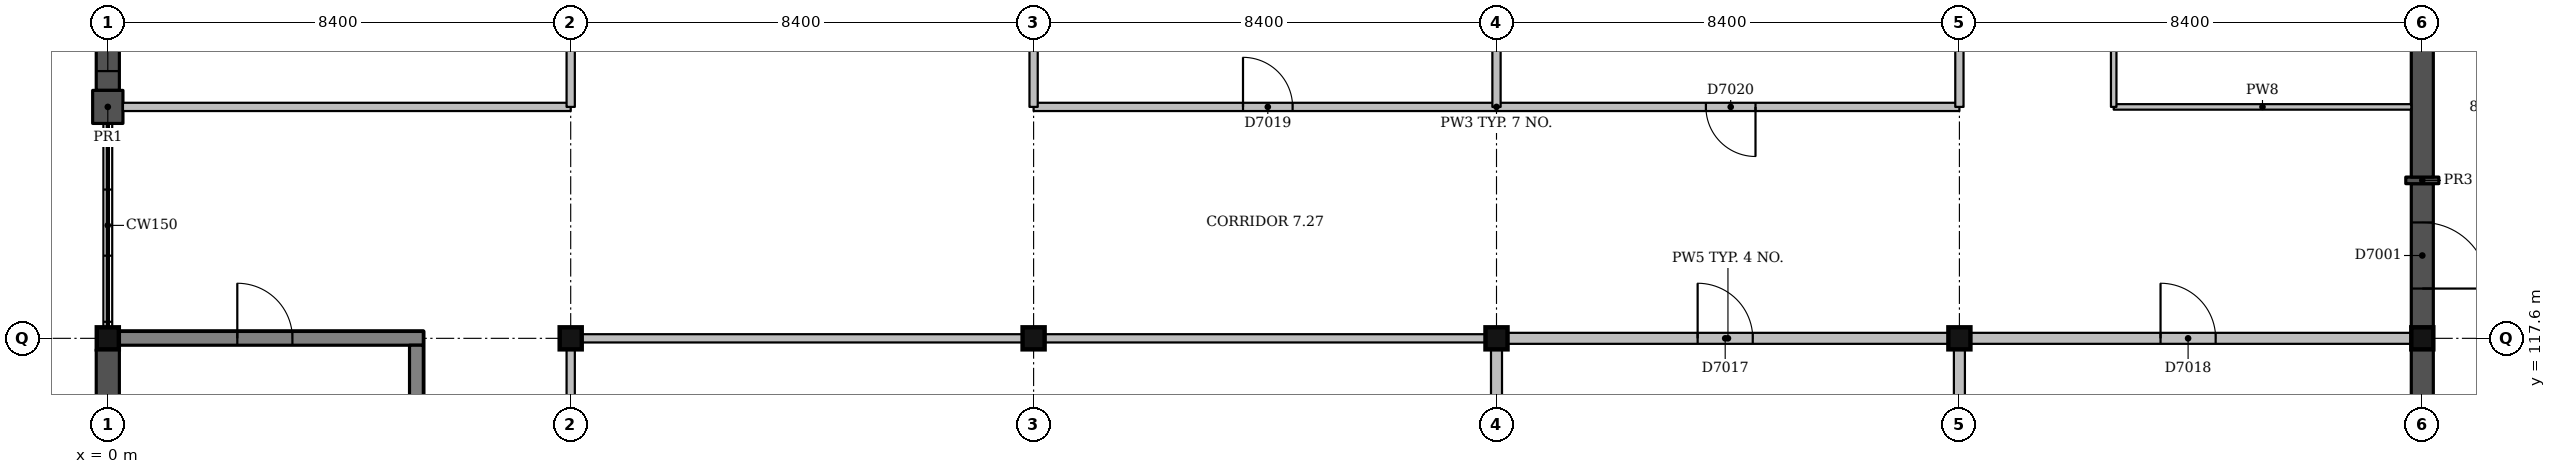
"""IFC4 building model, lengths in metres.
Left out: names, types, materials, properties, quantities, classifications, styles, units other than length and angle.
Written with IfcOpenShell. Run it as: python <this file> out.ifc"""

import sys

from ifc_helpers import new_model, si_unit, direction, frame, frame_2d, origin, origin_2d, place, context, subcontext, project, spatial, rectangle, extrude, element, fill, save


model = new_model("IFC4")
c1 = context("Model", 3, precision=1e-05, world=origin(), true_north=direction((0.0, 1.0)))
c2 = subcontext(c1, "Body", "Model", "MODEL_VIEW")
j1 = project(units=[si_unit("LENGTHUNIT", "METRE"), si_unit("PLANEANGLEUNIT", "RADIAN")], contexts=[c1])
p1 = place(None, origin())
s1 = spatial("IfcSite", under=j1, at=p1, CompositionType="ELEMENT")
p2 = place(p1, origin())
s2 = spatial("IfcBuilding", under=s1, at=p2, CompositionType="ELEMENT")
p3 = place(p2, frame((0.0, 0.0, 31.5)))
s3 = spatial("IfcBuildingStorey", under=s2, at=p3, CompositionType="ELEMENT", Elevation=31.5)
for number, where, z_axis, x_axis in (
    (1, (0.0, 117.6, 0.0), (0.0, 0.0, 1.0), (1.0, 0.0, 0.0)),
    (2, (8.4, 117.6, 0.0), (0.0, 0.0, 1.0), (1.0, 0.0, 0.0)),
    (3, (16.8, 117.6, 0.0), (0.0, 0.0, 1.0), (1.0, 0.0, 0.0)),
    (4, (25.2, 117.6, 0.0), (0.0, 0.0, 1.0), (1.0, 0.0, 0.0)),
    (5, (33.6, 117.6, 0.0), (0.0, 0.0, 1.0), (1.0, 0.0, 0.0)),
    (6, (42.0, 117.6, 0.0), (0.0, 0.0, 1.0), (1.0, 0.0, 0.0)),
):
    element("IfcColumn", number, at=place(p3, frame(where, z_axis=z_axis, x_axis=x_axis)), inside=s3, PredefinedType="COLUMN", context=c2, shape_type="SweptSolid", body=[
        extrude(rectangle(XDim=0.4, YDim=0.4, at=origin_2d()), origin(), (0.0, 0.0, 1.0), 4.5),
    ])
p4 = place(p3, frame((0.2, 117.6, 0.0), z_axis=(0.0, 0.0, 1.0), x_axis=(1.0, 0.0, 0.0)))
e7 = element("IfcWall", 7, at=p4, inside=s3, PredefinedType="SHEAR", context=c2, shape_type="SweptSolid", body=[
    extrude(rectangle(XDim=5.525, YDim=0.25, at=frame_2d((2.763, 0.0))), origin(), (0.0, 0.0, 1.0), 4.2),
])
p5 = place(p4, frame((2.15, 0.0, 0.0)))
e8 = element("IfcOpeningElement", 8, at=p5, cuts=e7, PredefinedType="OPENING", context=c2, shape_type="SweptSolid", body=[
    extrude(rectangle(XDim=1.0, YDim=2.1, at=frame_2d((0.5, 1.05))), frame((0.0, 0.135, 0.0), z_axis=(0.0, -1.0, 0.0), x_axis=(1.0, 0.0, 0.0)), (0.0, 0.0, 1.0), 0.27),
])
p6 = place(p3, frame((5.6, 109.325, 0.0), z_axis=(0.0, 0.0, 1.0), x_axis=(0.0, 1.0, 0.0)))
e9 = element("IfcWall", 9, at=p6, inside=s3, PredefinedType="SHEAR", context=c2, shape_type="SweptSolid", body=[
    extrude(rectangle(XDim=8.15, YDim=0.25, at=frame_2d((4.075, 0.0))), origin(), (0.0, 0.0, 1.0), 4.2),
])
p7 = place(p3, frame((42.0, 113.46, 0.0), z_axis=(0.0, 0.0, 1.0), x_axis=(0.0, 1.0, 0.0)))
e10 = element("IfcWall", 10, at=p7, inside=s3, PredefinedType="SOLIDWALL", context=c2, shape_type="SweptSolid", body=[
    extrude(rectangle(XDim=3.94, YDim=0.4, at=frame_2d((1.97, 0.0))), origin(), (0.0, 0.0, 1.0), 3.6),
])
p8 = place(p7, frame((1.37, 0.0, 2.4)))
e11 = element("IfcOpeningElement", 11, at=p8, cuts=e10, PredefinedType="OPENING", context=c2, shape_type="SweptSolid", body=[
    extrude(rectangle(XDim=1.2, YDim=0.6, at=frame_2d((0.6, 0.3))), frame((0.0, 0.21, 0.0), z_axis=(0.0, -1.0, 0.0), x_axis=(1.0, 0.0, 0.0)), (0.0, 0.0, 1.0), 0.42),
])
p9 = place(p3, frame((42.0, 117.8, 0.0), z_axis=(0.0, 0.0, 1.0), x_axis=(0.0, 1.0, 0.0)))
e12 = element("IfcWall", 12, at=p9, inside=s3, PredefinedType="SOLIDWALL", context=c2, shape_type="SweptSolid", body=[
    extrude(rectangle(XDim=2.607, YDim=0.4, at=frame_2d((1.303, 0.0))), origin(), (0.0, 0.0, 1.0), 3.6),
])
p10 = place(p9, frame((0.703, 0.0, 0.0)))
e13 = element("IfcOpeningElement", 13, at=p10, cuts=e12, PredefinedType="OPENING", context=c2, shape_type="SweptSolid", body=[
    extrude(rectangle(XDim=1.2, YDim=2.1, at=frame_2d((0.6, 1.05))), frame((0.0, 0.21, 0.0), z_axis=(0.0, -1.0, 0.0), x_axis=(1.0, 0.0, 0.0)), (0.0, 0.0, 1.0), 0.42),
])
p11 = place(p3, frame((42.0, 120.407, 0.0), z_axis=(0.0, 0.0, 1.0), x_axis=(0.0, 1.0, 0.0)))
e14 = element("IfcWall", 14, at=p11, inside=s3, PredefinedType="SOLIDWALL", context=c2, shape_type="SweptSolid", body=[
    extrude(rectangle(XDim=0.12, YDim=0.6, at=frame_2d((0.06, 0.0))), origin(), (0.0, 0.0, 1.0), 3.6),
])
p12 = place(p3, frame((42.0, 120.527, 0.0), z_axis=(0.0, 0.0, 1.0), x_axis=(0.0, 1.0, 0.0)))
e15 = element("IfcWall", 15, at=p12, inside=s3, PredefinedType="SOLIDWALL", context=c2, shape_type="SweptSolid", body=[
    extrude(rectangle(XDim=2.547, YDim=0.4, at=frame_2d((1.273, 0.0))), origin(), (0.0, 0.0, 1.0), 3.6),
])
p13 = place(p3, frame((0.0, 125.8, 0.0), z_axis=(0.0, 0.0, 1.0), x_axis=(0.0, -1.0, 0.0)))
e16 = element("IfcWall", 16, at=p13, inside=s3, PredefinedType="SOLIDWALL", context=c2, shape_type="SweptSolid", body=[
    extrude(rectangle(XDim=3.7, YDim=0.42, at=frame_2d((1.85, 0.0))), origin(), (0.0, 0.0, 1.0), 3.6),
])
p14 = place(p13, frame((0.35, 0.0, 1.0)))
e17 = element("IfcOpeningElement", 17, at=p14, cuts=e16, PredefinedType="OPENING", context=c2, shape_type="SweptSolid", body=[
    extrude(rectangle(XDim=0.6, YDim=2.1, at=frame_2d((0.3, 1.05))), frame((0.0, 0.22, 0.0), z_axis=(0.0, -1.0, 0.0), x_axis=(1.0, 0.0, 0.0)), (0.0, 0.0, 1.0), 0.44),
])
p15 = place(p13, frame((1.55, 0.0, 1.0)))
e18 = element("IfcOpeningElement", 18, at=p15, cuts=e16, PredefinedType="OPENING", context=c2, shape_type="SweptSolid", body=[
    extrude(rectangle(XDim=0.6, YDim=2.1, at=frame_2d((0.3, 1.05))), frame((0.0, 0.22, 0.0), z_axis=(0.0, -1.0, 0.0), x_axis=(1.0, 0.0, 0.0)), (0.0, 0.0, 1.0), 0.44),
])
p16 = place(p13, frame((2.75, 0.0, 1.0)))
e19 = element("IfcOpeningElement", 19, at=p16, cuts=e16, PredefinedType="OPENING", context=c2, shape_type="SweptSolid", body=[
    extrude(rectangle(XDim=0.6, YDim=2.1, at=frame_2d((0.3, 1.05))), frame((0.0, 0.22, 0.0), z_axis=(0.0, -1.0, 0.0), x_axis=(1.0, 0.0, 0.0)), (0.0, 0.0, 1.0), 0.44),
])
p17 = place(p3, frame((0.0, 122.1, 0.0), z_axis=(0.0, 0.0, 1.0), x_axis=(0.0, -1.0, 0.0)))
e20 = element("IfcWall", 20, at=p17, inside=s3, PredefinedType="SOLIDWALL", context=c2, shape_type="SweptSolid", body=[
    extrude(rectangle(XDim=0.6, YDim=0.55, at=frame_2d((0.3, 0.0))), origin(), (0.0, 0.0, 1.0), 3.6),
])
p18 = place(p3, frame((0.0, 117.4, 0.0), z_axis=(0.0, 0.0, 1.0), x_axis=(0.0, -1.0, 0.0)))
e21 = element("IfcWall", 21, at=p18, inside=s3, PredefinedType="SOLIDWALL", context=c2, shape_type="SweptSolid", body=[
    extrude(rectangle(XDim=3.7, YDim=0.42, at=frame_2d((1.85, 0.0))), origin(), (0.0, 0.0, 1.0), 4.2),
])
for number, where, z_axis, x_axis in (
    (22, (8.6, 117.6, 0.0), (0.0, 0.0, 1.0), (1.0, 0.0, 0.0)),
    (23, (17.0, 117.6, 0.0), (0.0, 0.0, 1.0), (1.0, 0.0, 0.0)),
):
    element("IfcWall", number, at=place(p3, frame(where, z_axis=z_axis, x_axis=x_axis)), inside=s3, PredefinedType="PARTITIONING", context=c2, shape_type="SweptSolid", body=[
        extrude(rectangle(XDim=8.0, YDim=0.15, at=frame_2d((4.0, 0.0))), origin(), (0.0, 0.0, 1.0), 3.6),
    ])
p19 = place(p3, frame((25.4, 117.6, 0.0), z_axis=(0.0, 0.0, 1.0), x_axis=(1.0, 0.0, 0.0)))
e24 = element("IfcWall", 24, at=p19, inside=s3, PredefinedType="PARTITIONING", context=c2, shape_type="SweptSolid", body=[
    extrude(rectangle(XDim=8.0, YDim=0.2, at=frame_2d((4.0, 0.0))), origin(), (0.0, 0.0, 1.0), 3.6),
])
p20 = place(p19, frame((3.45, 0.0, 0.0)))
e25 = element("IfcOpeningElement", 25, at=p20, cuts=e24, PredefinedType="OPENING", context=c2, shape_type="SweptSolid", body=[
    extrude(rectangle(XDim=1.0, YDim=2.1, at=frame_2d((0.5, 1.05))), frame((0.0, 0.11, 0.0), z_axis=(0.0, -1.0, 0.0), x_axis=(1.0, 0.0, 0.0)), (0.0, 0.0, 1.0), 0.22),
])
p21 = place(p3, frame((33.8, 117.6, 0.0), z_axis=(0.0, 0.0, 1.0), x_axis=(1.0, 0.0, 0.0)))
e26 = element("IfcWall", 26, at=p21, inside=s3, PredefinedType="PARTITIONING", context=c2, shape_type="SweptSolid", body=[
    extrude(rectangle(XDim=8.0, YDim=0.2, at=frame_2d((4.0, 0.0))), origin(), (0.0, 0.0, 1.0), 3.6),
])
p22 = place(p21, frame((3.45, 0.0, 0.0)))
e27 = element("IfcOpeningElement", 27, at=p22, cuts=e26, PredefinedType="OPENING", context=c2, shape_type="SweptSolid", body=[
    extrude(rectangle(XDim=1.0, YDim=2.1, at=frame_2d((0.5, 1.05))), frame((0.0, 0.11, 0.0), z_axis=(0.0, -1.0, 0.0), x_axis=(1.0, 0.0, 0.0)), (0.0, 0.0, 1.0), 0.22),
])
p23 = place(p3, frame((0.275, 121.8, 0.0), z_axis=(0.0, 0.0, 1.0), x_axis=(1.0, 0.0, 0.0)))
e28 = element("IfcWall", 28, at=p23, inside=s3, PredefinedType="PARTITIONING", context=c2, shape_type="SweptSolid", body=[
    extrude(rectangle(XDim=8.125, YDim=0.15, at=frame_2d((4.062, 0.0))), origin(), (0.0, 0.0, 1.0), 3.6),
])
p24 = place(p3, frame((16.8, 121.8, 0.0), z_axis=(0.0, 0.0, 1.0), x_axis=(1.0, 0.0, 0.0)))
e29 = element("IfcWall", 29, at=p24, inside=s3, PredefinedType="PARTITIONING", context=c2, shape_type="SweptSolid", body=[
    extrude(rectangle(XDim=16.8, YDim=0.15, at=frame_2d((8.4, 0.0))), origin(), (0.0, 0.0, 1.0), 3.6),
])
p25 = place(p24, frame((3.8, 0.0, 0.0)))
e30 = element("IfcOpeningElement", 30, at=p25, cuts=e29, PredefinedType="OPENING", context=c2, shape_type="SweptSolid", body=[
    extrude(rectangle(XDim=0.9, YDim=2.1, at=frame_2d((0.45, 1.05))), frame((0.0, 0.085, 0.0), z_axis=(0.0, -1.0, 0.0), x_axis=(1.0, 0.0, 0.0)), (0.0, 0.0, 1.0), 0.17),
])
p26 = place(p24, frame((12.2, 0.0, 0.0)))
e31 = element("IfcOpeningElement", 31, at=p26, cuts=e29, PredefinedType="OPENING", context=c2, shape_type="SweptSolid", body=[
    extrude(rectangle(XDim=0.9, YDim=2.1, at=frame_2d((0.45, 1.05))), frame((0.0, 0.085, 0.0), z_axis=(0.0, -1.0, 0.0), x_axis=(1.0, 0.0, 0.0)), (0.0, 0.0, 1.0), 0.17),
])
p27 = place(p3, frame((36.4, 121.8, 0.0), z_axis=(0.0, 0.0, 1.0), x_axis=(1.0, 0.0, 0.0)))
e32 = element("IfcWall", 32, at=p27, inside=s3, PredefinedType="PARTITIONING", context=c2, shape_type="SweptSolid", body=[
    extrude(rectangle(XDim=5.4, YDim=0.1, at=frame_2d((2.7, 0.0))), origin(), (0.0, 0.0, 1.0), 4.15),
])
p28 = place(p3, frame((8.4, 113.55, 0.0), z_axis=(0.0, 0.0, 1.0), x_axis=(0.0, 1.0, 0.0)))
e33 = element("IfcWall", 33, at=p28, inside=s3, PredefinedType="PARTITIONING", context=c2, shape_type="SweptSolid", body=[
    extrude(rectangle(XDim=3.85, YDim=0.15, at=frame_2d((1.925, 0.0))), origin(), (0.0, 0.0, 1.0), 3.6),
])
p29 = place(p28, frame((1.35, 0.0, 0.0)))
e34 = element("IfcOpeningElement", 34, at=p29, cuts=e33, PredefinedType="OPENING", context=c2, shape_type="SweptSolid", body=[
    extrude(rectangle(XDim=1.0, YDim=2.1, at=frame_2d((0.5, 1.05))), frame((0.0, 0.085, 0.0), z_axis=(0.0, -1.0, 0.0), x_axis=(1.0, 0.0, 0.0)), (0.0, 0.0, 1.0), 0.17),
])
p30 = place(p3, frame((8.4, 121.8, 0.0), z_axis=(0.0, 0.0, 1.0), x_axis=(0.0, 1.0, 0.0)))
e35 = element("IfcWall", 35, at=p30, inside=s3, PredefinedType="PARTITIONING", context=c2, shape_type="SweptSolid", body=[
    extrude(rectangle(XDim=4.0, YDim=0.15, at=frame_2d((2.0, 0.0))), origin(), (0.0, 0.0, 1.0), 3.6),
])
p31 = place(p30, frame((1.35, 0.0, 0.0)))
e36 = element("IfcOpeningElement", 36, at=p31, cuts=e35, PredefinedType="OPENING", context=c2, shape_type="SweptSolid", body=[
    extrude(rectangle(XDim=1.0, YDim=2.1, at=frame_2d((0.5, 1.05))), frame((0.0, 0.085, 0.0), z_axis=(0.0, -1.0, 0.0), x_axis=(1.0, 0.0, 0.0)), (0.0, 0.0, 1.0), 0.17),
])
p32 = place(p3, frame((16.8, 121.8, 0.0), z_axis=(0.0, 0.0, 1.0), x_axis=(0.0, 1.0, 0.0)))
e37 = element("IfcWall", 37, at=p32, inside=s3, PredefinedType="PARTITIONING", context=c2, shape_type="SweptSolid", body=[
    extrude(rectangle(XDim=4.0, YDim=0.15, at=frame_2d((2.0, 0.0))), origin(), (0.0, 0.0, 1.0), 3.6),
])
p33 = place(p3, frame((25.2, 109.4, 0.0), z_axis=(0.0, 0.0, 1.0), x_axis=(0.0, 1.0, 0.0)))
e38 = element("IfcWall", 38, at=p33, inside=s3, PredefinedType="PARTITIONING", context=c2, shape_type="SweptSolid", body=[
    extrude(rectangle(XDim=8.0, YDim=0.2, at=frame_2d((4.0, 0.0))), origin(), (0.0, 0.0, 1.0), 4.15),
])
for number, where, z_axis, x_axis in (
    (39, (25.2, 121.8, 0.0), (0.0, 0.0, 1.0), (0.0, 1.0, 0.0)),
    (40, (33.6, 121.8, 0.0), (0.0, 0.0, 1.0), (0.0, 1.0, 0.0)),
):
    element("IfcWall", number, at=place(p3, frame(where, z_axis=z_axis, x_axis=x_axis)), inside=s3, PredefinedType="PARTITIONING", context=c2, shape_type="SweptSolid", body=[
        extrude(rectangle(XDim=4.0, YDim=0.15, at=frame_2d((2.0, 0.0))), origin(), (0.0, 0.0, 1.0), 3.6),
    ])
p34 = place(p3, frame((33.6, 109.4, 0.0), z_axis=(0.0, 0.0, 1.0), x_axis=(0.0, 1.0, 0.0)))
e41 = element("IfcWall", 41, at=p34, inside=s3, PredefinedType="PARTITIONING", context=c2, shape_type="SweptSolid", body=[
    extrude(rectangle(XDim=8.0, YDim=0.2, at=frame_2d((4.0, 0.0))), origin(), (0.0, 0.0, 1.0), 3.6),
])
p35 = place(p3, frame((36.4, 121.8, 0.0), z_axis=(0.0, 0.0, 1.0), x_axis=(0.0, 1.0, 0.0)))
e42 = element("IfcWall", 42, at=p35, inside=s3, PredefinedType="PARTITIONING", context=c2, shape_type="SweptSolid", body=[
    extrude(rectangle(XDim=4.05, YDim=0.1, at=frame_2d((2.025, 0.0))), origin(), (0.0, 0.0, 1.0), 3.6),
])
p36 = place(p35, frame((1.7, 0.0, 0.0)))
e43 = element("IfcOpeningElement", 43, at=p36, cuts=e42, PredefinedType="OPENING", context=c2, shape_type="SweptSolid", body=[
    extrude(rectangle(XDim=0.9, YDim=2.1, at=frame_2d((0.45, 1.05))), frame((0.0, 0.06, 0.0), z_axis=(0.0, -1.0, 0.0), x_axis=(1.0, 0.0, 0.0)), (0.0, 0.0, 1.0), 0.12),
])
p37 = place(p10, origin())
e44 = element("IfcDoor", 44, at=p37, inside=s3, OperationType="SINGLE_SWING_LEFT", PredefinedType="DOOR", context=c2, shape_type="SweptSolid", body=[
    extrude(rectangle(XDim=1.2, YDim=2.1, at=frame_2d((0.6, 1.05))), frame((0.0, 0.025, 0.0), z_axis=(0.0, -1.0, 0.0), x_axis=(1.0, 0.0, 0.0)), (0.0, 0.0, 1.0), 0.05),
])
fill(e13, e44)
p38 = place(p16, origin())
e45 = element("IfcWindow", 45, at=p38, inside=s3, PartitioningType="SINGLE_PANEL", PredefinedType="WINDOW", context=c2, shape_type="SweptSolid", body=[
    extrude(rectangle(XDim=0.6, YDim=2.1, at=frame_2d((0.3, 1.05))), frame((0.0, 0.15, 0.0), z_axis=(0.0, -1.0, 0.0), x_axis=(1.0, 0.0, 0.0)), (0.0, 0.0, 1.0), 0.06),
])
fill(e19, e45)
p39 = place(p3, frame((0.0, 0.0, 4.2)))
p40 = place(p39, frame((21.0, 121.8, 0.0)))
p41 = place(p40, frame((0.0, 0.0, 0.25)))
e46 = element("IfcWindow", 46, at=p41, inside=s3, PartitioningType="SINGLE_PANEL", PredefinedType="SKYLIGHT", context=c2, shape_type="SweptSolid", body=[
    extrude(rectangle(XDim=0.9, YDim=1.2, at=origin_2d()), origin(), (0.0, 0.0, 1.0), 0.05),
])
p42 = place(p20, origin())
e47 = element("IfcDoor", 47, at=p42, inside=s3, OperationType="SINGLE_SWING_LEFT", PredefinedType="DOOR", context=c2, shape_type="SweptSolid", body=[
    extrude(rectangle(XDim=1.0, YDim=2.1, at=frame_2d((0.5, 1.05))), frame((0.0, 0.025, 0.0), z_axis=(0.0, -1.0, 0.0), x_axis=(1.0, 0.0, 0.0)), (0.0, 0.0, 1.0), 0.05),
])
fill(e25, e47)
p43 = place(p22, origin())
e48 = element("IfcDoor", 48, at=p43, inside=s3, OperationType="SINGLE_SWING_LEFT", PredefinedType="DOOR", context=c2, shape_type="SweptSolid", body=[
    extrude(rectangle(XDim=1.0, YDim=2.1, at=frame_2d((0.5, 1.05))), frame((0.0, 0.025, 0.0), z_axis=(0.0, -1.0, 0.0), x_axis=(1.0, 0.0, 0.0)), (0.0, 0.0, 1.0), 0.05),
])
fill(e27, e48)
p44 = place(p25, origin())
e49 = element("IfcDoor", 49, at=p44, inside=s3, OperationType="SINGLE_SWING_LEFT", PredefinedType="DOOR", context=c2, shape_type="SweptSolid", body=[
    extrude(rectangle(XDim=0.9, YDim=2.1, at=frame_2d((0.45, 1.05))), frame((0.0, 0.025, 0.0), z_axis=(0.0, -1.0, 0.0), x_axis=(1.0, 0.0, 0.0)), (0.0, 0.0, 1.0), 0.05),
])
fill(e30, e49)
p45 = place(p26, origin())
e50 = element("IfcDoor", 50, at=p45, inside=s3, OperationType="SINGLE_SWING_RIGHT", PredefinedType="DOOR", context=c2, shape_type="SweptSolid", body=[
    extrude(rectangle(XDim=0.9, YDim=2.1, at=frame_2d((0.45, 1.05))), frame((0.0, 0.025, 0.0), z_axis=(0.0, -1.0, 0.0), x_axis=(1.0, 0.0, 0.0)), (0.0, 0.0, 1.0), 0.05),
])
fill(e31, e50)
p46 = place(p5, origin())
e51 = element("IfcDoor", 51, at=p46, inside=s3, OperationType="SINGLE_SWING_LEFT", PredefinedType="DOOR", context=c2, shape_type="SweptSolid", body=[
    extrude(rectangle(XDim=1.0, YDim=2.1, at=frame_2d((0.5, 1.05))), frame((0.0, 0.025, 0.0), z_axis=(0.0, -1.0, 0.0), x_axis=(1.0, 0.0, 0.0)), (0.0, 0.0, 1.0), 0.05),
])
fill(e8, e51)
save(model, sys.argv[1])
